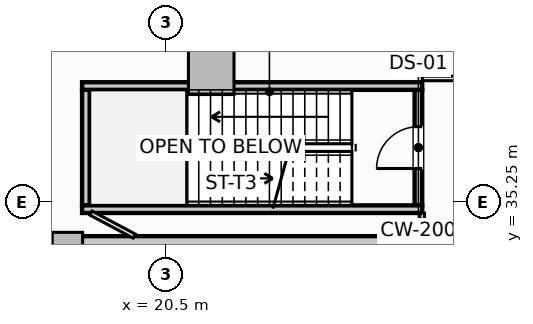
"""IFC4 building model, lengths in metres.
Left out: names, types, materials, properties, quantities, classifications, styles, units other than length and angle.
Written with IfcOpenShell. Run it as: python <this file> out.ifc"""

import sys

from ifc_helpers import new_model, si_unit, direction, frame, frame_2d, origin, origin_2d, place, context, subcontext, project, spatial, rectangle, extrude, element, fill, save


model = new_model("IFC4")
c1 = context("Model", 3, precision=1e-05, world=origin(), true_north=direction((0.0, 1.0)))
c2 = subcontext(c1, "Body", "Model", "MODEL_VIEW")
j1 = project(units=[si_unit("LENGTHUNIT", "METRE"), si_unit("PLANEANGLEUNIT", "RADIAN")], contexts=[c1])
p1 = place(None, origin())
s1 = spatial("IfcSite", under=j1, at=p1, CompositionType="ELEMENT")
p2 = place(p1, origin())
s2 = spatial("IfcBuilding", under=s1, at=p2, CompositionType="ELEMENT")
p3 = place(p2, frame((0.0, 0.0, 5.0)))
s3 = spatial("IfcBuildingStorey", under=s2, at=p3, CompositionType="ELEMENT", Elevation=5.0)
p4 = place(p3, frame((14.075, 33.925, -0.26), z_axis=(0.0, 0.0, 1.0), x_axis=(1.0, 0.0, 0.0)))
e1 = element("IfcWall", 1, at=p4, inside=s3, PredefinedType="SHEAR", context=c2, shape_type="SweptSolid", body=[
    extrude(rectangle(XDim=13.85, YDim=0.85, at=frame_2d((6.925, 0.0))), origin(), (0.0, 0.0, 1.0), 5.0),
])
p5 = place(p3, frame((21.698, 38.677, -0.26), z_axis=(0.0, 0.0, 1.0), x_axis=(1.0, 0.0, 0.0)))
e2 = element("IfcColumn", 2, at=p5, inside=s3, PredefinedType="COLUMN", context=c2, shape_type="SweptSolid", body=[
    extrude(rectangle(XDim=1.2, YDim=1.2, at=origin_2d()), origin(), (0.0, 0.0, 1.0), 5.0),
])
p6 = place(p3, frame((17.914, 34.05, -0.26), z_axis=(0.0, 0.0, 1.0), x_axis=(1.0, 0.0, 0.0)))
e3 = element("IfcColumn", 3, at=p6, inside=s3, PredefinedType="PILASTER", context=c2, shape_type="SweptSolid", body=[
    extrude(rectangle(XDim=0.8, YDim=0.8, at=origin_2d()), origin(), (0.0, 0.0, 1.0), 5.0),
])
p7 = place(p3, frame((27.15, 35.16, -0.26), z_axis=(0.0, 0.0, 1.0), x_axis=(0.0, 1.0, 0.0)))
e4 = element("IfcWall", 4, at=p7, inside=s3, PredefinedType="SHEAR", context=c2, shape_type="SweptSolid", body=[
    extrude(rectangle(XDim=3.04, YDim=0.2, at=frame_2d((1.52, 0.0))), origin(), (0.0, 0.0, 1.0), 5.0),
])
p8 = place(p7, frame((0.97, 0.0, 0.26)))
e5 = element("IfcOpeningElement", 5, at=p8, cuts=e4, PredefinedType="OPENING", context=c2, shape_type="SweptSolid", body=[
    extrude(rectangle(XDim=1.1, YDim=2.15, at=frame_2d((0.55, 1.075))), frame((0.0, 0.11, 0.0), z_axis=(0.0, -1.0, 0.0), x_axis=(1.0, 0.0, 0.0)), (0.0, 0.0, 1.0), 0.22),
])
p9 = place(p3, frame((18.4, 35.16, -0.26), z_axis=(0.0, 0.0, 1.0), x_axis=(0.0, 1.0, 0.0)))
e6 = element("IfcWall", 6, at=p9, inside=s3, PredefinedType="SHEAR", context=c2, shape_type="SweptSolid", body=[
    extrude(rectangle(XDim=3.04, YDim=0.2, at=frame_2d((1.52, 0.0))), origin(), (0.0, 0.0, 1.0), 5.0),
])
for number, where, z_axis, x_axis in (
    (7, (18.3, 38.3, -0.26), (0.0, 0.0, 1.0), (1.0, 0.0, 0.0)),
    (8, (18.3, 35.06, -0.26), (0.0, 0.0, 1.0), (1.0, 0.0, 0.0)),
):
    element("IfcWall", number, at=place(p3, frame(where, z_axis=z_axis, x_axis=x_axis)), inside=s3, PredefinedType="SHEAR", context=c2, shape_type="SweptSolid", body=[
        extrude(rectangle(XDim=8.95, YDim=0.2, at=frame_2d((4.475, 0.0))), origin(), (0.0, 0.0, 1.0), 5.0),
    ])
p10 = place(p3, frame((27.25, 34.352, 0.0), z_axis=(0.0, 0.0, 1.0), x_axis=(0.0, 1.0, 0.0)))
e9 = element("IfcWall", 9, at=p10, inside=s3, PredefinedType="PARTITIONING", context=c2, shape_type="SweptSolid", body=[
    extrude(rectangle(XDim=0.606, YDim=0.12, at=frame_2d((0.303, 0.0))), origin(), (0.0, 0.0, 1.0), 4.74),
])
p11 = place(p3, frame((27.25, 38.5, 0.0), z_axis=(0.0, 0.0, 1.0), x_axis=(1.0, 0.0, 0.0)))
e10 = element("IfcWall", 10, at=p11, inside=s3, PredefinedType="PARTITIONING", context=c2, shape_type="SweptSolid", body=[
    extrude(rectangle(XDim=2.468, YDim=0.12, at=frame_2d((1.234, 0.0))), origin(), (0.0, 0.0, 1.0), 4.74),
])
p12 = place(p3, frame((18.533, 34.958, 0.0), z_axis=(0.0, 0.0, 1.0), x_axis=(0.883032467315, -0.469311902329, 0.0)))
e11 = element("IfcWall", 11, at=p12, inside=s3, PredefinedType="PARTITIONING", context=c2, shape_type="SweptSolid", body=[
    extrude(rectangle(XDim=1.291, YDim=0.12, at=frame_2d((0.646, 0.0))), origin(), (0.0, 0.0, 1.0), 4.74),
])
p13 = place(p8, origin())
e12 = element("IfcDoor", 12, at=p13, inside=s3, OperationType="SINGLE_SWING_LEFT", PredefinedType="DOOR", context=c2, shape_type="SweptSolid", body=[
    extrude(rectangle(XDim=1.1, YDim=2.15, at=frame_2d((0.55, 1.075))), frame((0.0, 0.025, 0.0), z_axis=(0.0, -1.0, 0.0), x_axis=(1.0, 0.0, 0.0)), (0.0, 0.0, 1.0), 0.05),
])
fill(e5, e12)
save(model, sys.argv[1])
